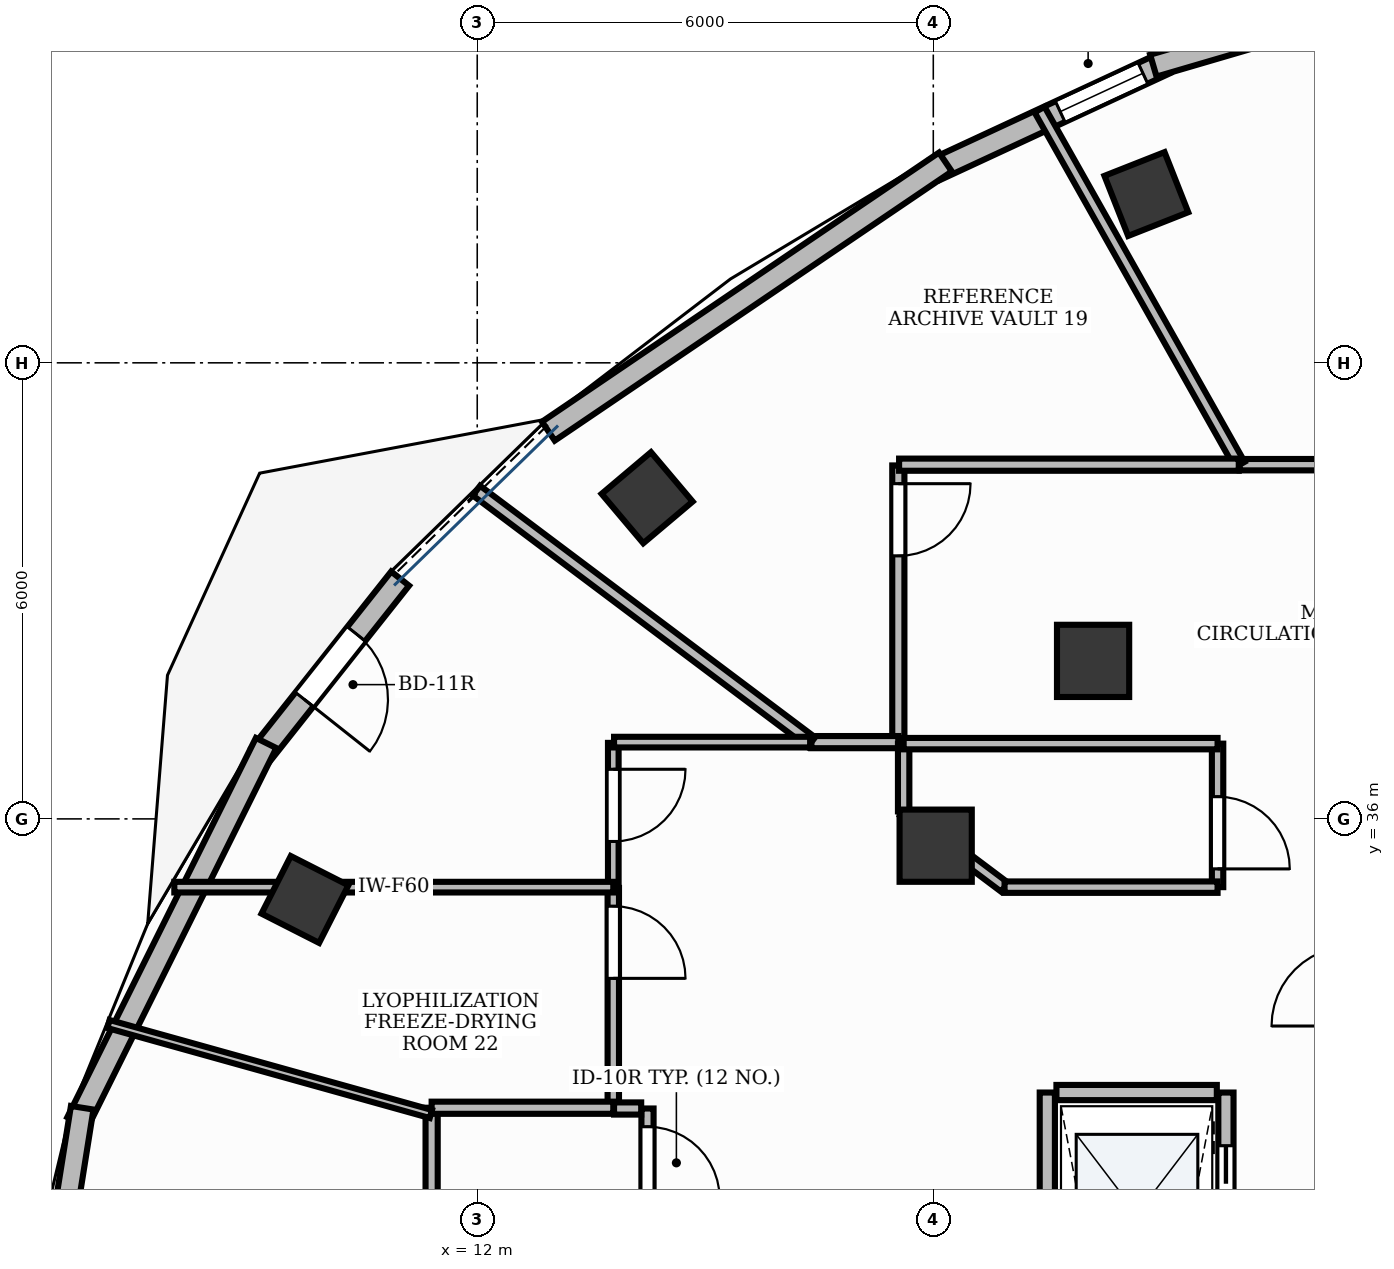
"""IFC4 building model, lengths in metres.
Left out: names, types, materials, properties, quantities, classifications, styles, units other than length and angle.
Written with IfcOpenShell. Run it as: python <this file> out.ifc"""

import sys

from ifc_helpers import new_model, si_unit, direction, frame, frame_2d, origin, origin_2d, place, context, subcontext, project, spatial, rectangle, extrude, element, fill, save


model = new_model("IFC4")
c1 = context("Model", 3, precision=1e-05, world=origin(), true_north=direction((0.0, 1.0)))
c2 = subcontext(c1, "Body", "Model", "MODEL_VIEW")
j1 = project(units=[si_unit("LENGTHUNIT", "METRE"), si_unit("PLANEANGLEUNIT", "RADIAN")], contexts=[c1])
p1 = place(None, origin())
s1 = spatial("IfcSite", under=j1, at=p1, CompositionType="ELEMENT")
p2 = place(p1, origin())
s2 = spatial("IfcBuilding", under=s1, at=p2, CompositionType="ELEMENT")
p3 = place(p2, frame((0.0, 0.0, 252.0)))
s3 = spatial("IfcBuildingStorey", under=s2, at=p3, CompositionType="ELEMENT", Elevation=252.0)
for number, where, z_axis, x_axis in (
    (1, (20.803, 44.22, -0.0), (0.0, 0.0, 1.0), (0.93, 0.367, 0.0)),
    (2, (14.235, 40.225, -0.0), (0.0, 0.0, 1.0), (0.764, 0.645, 0.0)),
):
    element("IfcColumn", number, at=place(p3, frame(where, z_axis=z_axis, x_axis=x_axis)), inside=s3, PredefinedType="COLUMN", context=c2, shape_type="SweptSolid", body=[
        extrude(rectangle(XDim=0.85, YDim=0.85, at=origin_2d()), origin(), (0.0, 0.0, 1.0), 3.901),
    ])
p4 = place(p3, frame((20.102, 38.079, -0.0), z_axis=(0.0, 0.0, 1.0), x_axis=(1.0, 0.0, 0.0)))
e3 = element("IfcColumn", 3, at=p4, inside=s3, PredefinedType="COLUMN", context=c2, shape_type="SweptSolid", body=[
    extrude(rectangle(XDim=0.95, YDim=0.95, at=origin_2d()), origin(), (0.0, 0.0, 1.0), 3.901),
])
p5 = place(p3, frame((9.733, 34.94, -0.0), z_axis=(0.0, 0.0, 1.0), x_axis=(0.453057191132, 0.891481453292, 0.0)))
e4 = element("IfcColumn", 4, at=p5, inside=s3, PredefinedType="COLUMN", context=c2, shape_type="SweptSolid", body=[
    extrude(rectangle(XDim=0.85, YDim=0.85, at=origin_2d()), origin(), (0.0, 0.0, 1.0), 3.901),
])
p6 = place(p3, frame((18.031, 35.647, -0.0), z_axis=(0.0, 0.0, 1.0), x_axis=(1.0, 0.0, 0.0)))
e5 = element("IfcColumn", 5, at=p6, inside=s3, PredefinedType="COLUMN", context=c2, shape_type="SweptSolid", body=[
    extrude(rectangle(XDim=0.95, YDim=0.95, at=origin_2d()), origin(), (0.0, 0.0, 1.0), 3.901),
])
p7 = place(p3, frame((21.054, 45.947, 0.0), z_axis=(0.0, 0.0, 1.0), x_axis=(-0.907141680649, -0.420825345278, 0.0)))
e6 = element("IfcWall", 6, at=p7, inside=s3, PredefinedType="STANDARD", context=c2, shape_type="SweptSolid", body=[
    extrude(rectangle(XDim=3.336, YDim=0.3, at=frame_2d((1.668, 0.0))), origin(), (0.0, 0.0, 1.0), 3.9),
])
p8 = place(p7, frame((0.326, 0.0, 0.9)))
e7 = element("IfcOpeningElement", 7, at=p8, cuts=e6, PredefinedType="OPENING", context=c2, shape_type="SweptSolid", body=[
    extrude(rectangle(XDim=1.2, YDim=2.7, at=frame_2d((0.6, 1.35))), frame((0.0, 0.165, 0.0), z_axis=(0.0, -1.0, 0.0), x_axis=(1.0, 0.0, 0.0)), (0.0, 0.0, 1.0), 0.33),
])
p9 = place(p3, frame((10.986, 39.161, 0.0), z_axis=(0.0, 0.0, 1.0), x_axis=(-0.620861534092, -0.783920248166, 0.0)))
e8 = element("IfcWall", 8, at=p9, inside=s3, PredefinedType="STANDARD", context=c2, shape_type="SweptSolid", body=[
    extrude(rectangle(XDim=2.957, YDim=0.3, at=frame_2d((1.479, 0.0))), origin(), (0.0, 0.0, 1.0), 3.9),
])
p10 = place(p9, frame((0.929, 0.0, 0.0)))
e9 = element("IfcOpeningElement", 9, at=p10, cuts=e8, PredefinedType="OPENING", context=c2, shape_type="SweptSolid", body=[
    extrude(rectangle(XDim=1.1, YDim=2.15, at=frame_2d((0.55, 1.075))), frame((0.0, 0.165, 0.0), z_axis=(0.0, -1.0, 0.0), x_axis=(1.0, 0.0, 0.0)), (0.0, 0.0, 1.0), 0.33),
])
p11 = place(p3, frame((27.418, 47.82, 0.0), z_axis=(0.0, 0.0, 1.0), x_axis=(-0.959675502853, -0.281110172749, 0.0)))
e10 = element("IfcWall", 10, at=p11, inside=s3, PredefinedType="STANDARD", context=c2, shape_type="SweptSolid", body=[
    extrude(rectangle(XDim=6.797, YDim=0.3, at=frame_2d((3.398, 0.0))), origin(), (0.0, 0.0, 1.0), 3.47),
])
p12 = place(p3, frame((18.159, 44.642, 0.0), z_axis=(0.0, 0.0, 1.0), x_axis=(-0.827734383496, -0.561120121167, 0.0)))
e11 = element("IfcWall", 11, at=p12, inside=s3, PredefinedType="STANDARD", context=c2, shape_type="SweptSolid", body=[
    extrude(rectangle(XDim=6.311, YDim=0.3, at=frame_2d((3.156, 0.0))), origin(), (0.0, 0.0, 1.0), 3.9),
])
p13 = place(p3, frame((9.222, 36.999, 0.0), z_axis=(0.0, 0.0, 1.0), x_axis=(-0.445162072567, -0.89545001488, 0.0)))
e12 = element("IfcWall", 12, at=p13, inside=s3, PredefinedType="STANDARD", context=c2, shape_type="SweptSolid", body=[
    extrude(rectangle(XDim=5.573, YDim=0.3, at=frame_2d((2.786, 0.0))), origin(), (0.0, 0.0, 1.0), 3.47),
])
p14 = place(p3, frame((6.803, 32.2, 0.0), z_axis=(0.0, 0.0, 1.0), x_axis=(-0.157240066957, -0.987560408959, 0.0)))
e13 = element("IfcWall", 13, at=p14, inside=s3, PredefinedType="STANDARD", context=c2, shape_type="SweptSolid", body=[
    extrude(rectangle(XDim=5.367, YDim=0.3, at=frame_2d((2.684, 0.0))), origin(), (0.0, 0.0, 1.0), 3.47),
])
p15 = place(p3, frame((19.5, 21.6, 0.0), z_axis=(0.0, 0.0, 1.0), x_axis=(0.0, 1.0, 0.0)))
e14 = element("IfcWall", 14, at=p15, inside=s3, PredefinedType="PARTITIONING", context=c2, shape_type="SweptSolid", body=[
    extrude(rectangle(XDim=10.8, YDim=0.2, at=frame_2d((5.4, 0.0))), origin(), (0.0, 0.0, 1.0), 2.91),
])
p16 = place(p3, frame((21.85, 21.6, 0.0), z_axis=(0.0, 0.0, 1.0), x_axis=(0.0, 1.0, 0.0)))
e15 = element("IfcWall", 15, at=p16, inside=s3, PredefinedType="PARTITIONING", context=c2, shape_type="SweptSolid", body=[
    extrude(rectangle(XDim=10.8, YDim=0.2, at=frame_2d((5.4, 0.0))), origin(), (0.0, 0.0, 1.0), 2.91),
])
p17 = place(p16, frame((0.9, 0.0, 0.0)))
e16 = element("IfcOpeningElement", 16, at=p17, cuts=e15, PredefinedType="OPENING", context=c2, shape_type="SweptSolid", body=[
    extrude(rectangle(XDim=1.1, YDim=2.2, at=frame_2d((0.55, 1.1))), frame((0.0, 0.115, 0.0), z_axis=(0.0, -1.0, 0.0), x_axis=(1.0, 0.0, 0.0)), (0.0, 0.0, 1.0), 0.23),
])
p18 = place(p16, frame((3.6, 0.0, 0.0)))
e17 = element("IfcOpeningElement", 17, at=p18, cuts=e15, PredefinedType="OPENING", context=c2, shape_type="SweptSolid", body=[
    extrude(rectangle(XDim=1.1, YDim=2.2, at=frame_2d((0.55, 1.1))), frame((0.0, 0.115, 0.0), z_axis=(0.0, -1.0, 0.0), x_axis=(1.0, 0.0, 0.0)), (0.0, 0.0, 1.0), 0.23),
])
p19 = place(p16, frame((6.3, 0.0, 0.0)))
e18 = element("IfcOpeningElement", 18, at=p19, cuts=e15, PredefinedType="OPENING", context=c2, shape_type="SweptSolid", body=[
    extrude(rectangle(XDim=1.1, YDim=2.2, at=frame_2d((0.55, 1.1))), frame((0.0, 0.115, 0.0), z_axis=(0.0, -1.0, 0.0), x_axis=(1.0, 0.0, 0.0)), (0.0, 0.0, 1.0), 0.23),
])
p20 = place(p16, frame((9.0, 0.0, 0.0)))
e19 = element("IfcOpeningElement", 19, at=p20, cuts=e15, PredefinedType="OPENING", context=c2, shape_type="SweptSolid", body=[
    extrude(rectangle(XDim=1.1, YDim=2.2, at=frame_2d((0.55, 1.1))), frame((0.0, 0.115, 0.0), z_axis=(0.0, -1.0, 0.0), x_axis=(1.0, 0.0, 0.0)), (0.0, 0.0, 1.0), 0.23),
])
p21 = place(p3, frame((19.62, 32.4, 0.0), z_axis=(0.0, 0.0, 1.0), x_axis=(1.0, 0.0, 0.0)))
e20 = element("IfcWall", 20, at=p21, inside=s3, PredefinedType="PARTITIONING", context=c2, shape_type="SweptSolid", body=[
    extrude(rectangle(XDim=2.11, YDim=0.2, at=frame_2d((1.055, 0.0))), origin(), (0.0, 0.0, 1.0), 2.91),
])
p22 = place(p3, frame((14.24, 32.19, 0.0), z_axis=(0.0, 0.0, 1.0), x_axis=(0.0, -1.0, 0.0)))
e21 = element("IfcWall", 21, at=p22, inside=s3, PredefinedType="PARTITIONING", context=c2, shape_type="SweptSolid", body=[
    extrude(rectangle(XDim=4.99, YDim=0.16, at=frame_2d((2.495, 0.0))), origin(), (0.0, 0.0, 1.0), 2.91),
])
p23 = place(p22, frame((0.24, 0.0, 0.0)))
e22 = element("IfcOpeningElement", 22, at=p23, cuts=e21, PredefinedType="OPENING", context=c2, shape_type="SweptSolid", body=[
    extrude(rectangle(XDim=0.95, YDim=2.15, at=frame_2d((0.475, 1.075))), frame((0.0, 0.095, 0.0), z_axis=(0.0, -1.0, 0.0), x_axis=(1.0, 0.0, 0.0)), (0.0, 0.0, 1.0), 0.19),
])
p24 = place(p3, frame((28.354, 40.66, 0.0), z_axis=(0.0, 0.0, 1.0), x_axis=(-1.0, 0.0, 0.0)))
e23 = element("IfcWall", 23, at=p24, inside=s3, PredefinedType="PARTITIONING", context=c2, shape_type="SweptSolid", body=[
    extrude(rectangle(XDim=6.323, YDim=0.15, at=frame_2d((3.162, 0.0))), origin(), (0.0, 0.0, 1.0), 2.91),
])
p25 = place(p24, frame((0.24, 0.0, 0.0)))
e24 = element("IfcOpeningElement", 24, at=p25, cuts=e23, PredefinedType="OPENING", context=c2, shape_type="SweptSolid", body=[
    extrude(rectangle(XDim=0.95, YDim=2.15, at=frame_2d((0.475, 1.075))), frame((0.0, 0.09, 0.0), z_axis=(0.0, -1.0, 0.0), x_axis=(1.0, 0.0, 0.0)), (0.0, 0.0, 1.0), 0.18),
])
p26 = place(p3, frame((17.54, 40.65, 0.0), z_axis=(0.0, 0.0, 1.0), x_axis=(0.0, -1.0, 0.0)))
e25 = element("IfcWall", 25, at=p26, inside=s3, PredefinedType="PARTITIONING", context=c2, shape_type="SweptSolid", body=[
    extrude(rectangle(XDim=3.64, YDim=0.16, at=frame_2d((1.82, 0.0))), origin(), (0.0, 0.0, 1.0), 2.91),
])
p27 = place(p26, frame((0.24, 0.0, 0.0)))
e26 = element("IfcOpeningElement", 26, at=p27, cuts=e25, PredefinedType="OPENING", context=c2, shape_type="SweptSolid", body=[
    extrude(rectangle(XDim=0.95, YDim=2.15, at=frame_2d((0.475, 1.075))), frame((0.0, 0.095, 0.0), z_axis=(0.0, -1.0, 0.0), x_axis=(1.0, 0.0, 0.0)), (0.0, 0.0, 1.0), 0.19),
])
p28 = place(p3, frame((21.74, 36.99, 0.0), z_axis=(0.0, 0.0, 1.0), x_axis=(0.0, -1.0, 0.0)))
e27 = element("IfcWall", 27, at=p28, inside=s3, PredefinedType="PARTITIONING", context=c2, shape_type="SweptSolid", body=[
    extrude(rectangle(XDim=1.888, YDim=0.15, at=frame_2d((0.944, 0.0))), origin(), (0.0, 0.0, 1.0), 2.91),
])
p29 = place(p28, frame((0.698, 0.0, 0.0)))
e28 = element("IfcOpeningElement", 28, at=p29, cuts=e27, PredefinedType="OPENING", context=c2, shape_type="SweptSolid", body=[
    extrude(rectangle(XDim=0.95, YDim=2.15, at=frame_2d((0.475, 1.075))), frame((0.0, 0.09, 0.0), z_axis=(0.0, -1.0, 0.0), x_axis=(1.0, 0.0, 0.0)), (0.0, 0.0, 1.0), 0.18),
])
p30 = place(p3, frame((13.79, 37.0, 0.0), z_axis=(0.0, 0.0, 1.0), x_axis=(0.0, -1.0, 0.0)))
e29 = element("IfcWall", 29, at=p30, inside=s3, PredefinedType="PARTITIONING", context=c2, shape_type="SweptSolid", body=[
    extrude(rectangle(XDim=1.898, YDim=0.14, at=frame_2d((0.949, 0.0))), origin(), (0.0, 0.0, 1.0), 2.91),
])
p31 = place(p30, frame((0.347, 0.0, 0.0)))
e30 = element("IfcOpeningElement", 30, at=p31, cuts=e29, PredefinedType="OPENING", context=c2, shape_type="SweptSolid", body=[
    extrude(rectangle(XDim=0.95, YDim=2.15, at=frame_2d((0.475, 1.075))), frame((0.0, 0.085, 0.0), z_axis=(0.0, -1.0, 0.0), x_axis=(1.0, 0.0, 0.0)), (0.0, 0.0, 1.0), 0.17),
])
p32 = place(p3, frame((13.79, 35.092, 0.0), z_axis=(0.0, 0.0, 1.0), x_axis=(0.0, -1.0, 0.0)))
e31 = element("IfcWall", 31, at=p32, inside=s3, PredefinedType="PARTITIONING", context=c2, shape_type="SweptSolid", body=[
    extrude(rectangle(XDim=2.882, YDim=0.15, at=frame_2d((1.441, 0.0))), origin(), (0.0, 0.0, 1.0), 2.91),
])
p33 = place(p32, frame((0.24, 0.0, 0.0)))
e32 = element("IfcOpeningElement", 32, at=p33, cuts=e31, PredefinedType="OPENING", context=c2, shape_type="SweptSolid", body=[
    extrude(rectangle(XDim=0.95, YDim=2.15, at=frame_2d((0.475, 1.075))), frame((0.0, 0.09, 0.0), z_axis=(0.0, -1.0, 0.0), x_axis=(1.0, 0.0, 0.0)), (0.0, 0.0, 1.0), 0.18),
])
p34 = place(p3, frame((13.8, 32.19, 0.0), z_axis=(0.0, 0.0, 1.0), x_axis=(1.0, 0.0, 0.0)))
e33 = element("IfcWall", 33, at=p34, inside=s3, PredefinedType="PARTITIONING", context=c2, shape_type="SweptSolid", body=[
    extrude(rectangle(XDim=0.357, YDim=0.16, at=frame_2d((0.178, 0.0))), origin(), (0.0, 0.0, 1.0), 2.91),
])
p35 = place(p3, frame((11.4, 27.2, 0.0), z_axis=(0.0, 0.0, 1.0), x_axis=(0.0, 1.0, 0.0)))
e34 = element("IfcWall", 34, at=p35, inside=s3, PredefinedType="PARTITIONING", context=c2, shape_type="SweptSolid", body=[
    extrude(rectangle(XDim=5.0, YDim=0.16, at=frame_2d((2.5, 0.0))), origin(), (0.0, 0.0, 1.0), 2.91),
])
p36 = place(p3, frame((11.4, 32.2, 0.0), z_axis=(0.0, 0.0, 1.0), x_axis=(1.0, 0.0, 0.0)))
e35 = element("IfcWall", 35, at=p36, inside=s3, PredefinedType="PARTITIONING", context=c2, shape_type="SweptSolid", body=[
    extrude(rectangle(XDim=2.39, YDim=0.16, at=frame_2d((1.195, 0.0))), origin(), (0.0, 0.0, 1.0), 2.91),
])
p37 = place(p3, frame((7.149, 33.301, 0.0), z_axis=(0.0, 0.0, 1.0), x_axis=(0.963167586418, -0.268901841707, 0.0)))
e36 = element("IfcWall", 36, at=p37, inside=s3, PredefinedType="MOVABLE", context=c2, shape_type="SweptSolid", body=[
    extrude(rectangle(XDim=4.403, YDim=0.11, at=frame_2d((2.202, 0.0))), origin(), (0.0, 0.0, 1.0), 2.91),
])
p38 = place(p3, frame((22.031, 40.66, 0.0), z_axis=(0.0, 0.0, 1.0), x_axis=(-0.490903118402, 0.871214169044, 0.0)))
e37 = element("IfcWall", 37, at=p38, inside=s3, PredefinedType="PARTITIONING", context=c2, shape_type="SweptSolid", body=[
    extrude(rectangle(XDim=5.362, YDim=0.15, at=frame_2d((2.681, 0.0))), origin(), (0.0, 0.0, 1.0), 2.91),
])
p39 = place(p3, frame((22.019, 40.66, 0.0), z_axis=(0.0, 0.0, 1.0), x_axis=(-1.0, 0.0, 0.0)))
e38 = element("IfcWall", 38, at=p39, inside=s3, PredefinedType="PARTITIONING", context=c2, shape_type="SweptSolid", body=[
    extrude(rectangle(XDim=4.469, YDim=0.16, at=frame_2d((2.234, 0.0))), origin(), (0.0, 0.0, 1.0), 2.91),
])
p40 = place(p3, frame((17.54, 37.01, 0.0), z_axis=(0.0, 0.0, 1.0), x_axis=(-1.0, 0.0, 0.0)))
e39 = element("IfcWall", 39, at=p40, inside=s3, PredefinedType="PARTITIONING", context=c2, shape_type="SweptSolid", body=[
    extrude(rectangle(XDim=1.144, YDim=0.16, at=frame_2d((0.572, 0.0))), origin(), (0.0, 0.0, 1.0), 2.91),
])
p41 = place(p3, frame((16.396, 37.01, 0.0), z_axis=(0.0, 0.0, 1.0), x_axis=(-0.799686236125, 0.600418124104, 0.0)))
e40 = element("IfcWall", 40, at=p41, inside=s3, PredefinedType="PARTITIONING", context=c2, shape_type="SweptSolid", body=[
    extrude(rectangle(XDim=5.511, YDim=0.16, at=frame_2d((2.755, 0.0))), origin(), (0.0, 0.0, 1.0), 2.91),
])
p42 = place(p3, frame((18.938, 35.102, 0.0), z_axis=(0.0, 0.0, 1.0), x_axis=(-0.799629226512, 0.600494046689, 0.0)))
e41 = element("IfcWall", 41, at=p42, inside=s3, PredefinedType="PARTITIONING", context=c2, shape_type="SweptSolid", body=[
    extrude(rectangle(XDim=1.66, YDim=0.15, at=frame_2d((0.83, 0.0))), origin(), (0.0, 0.0, 1.0), 2.91),
])
p43 = place(p3, frame((17.61, 36.099, 0.0), z_axis=(0.0, 0.0, 1.0), x_axis=(0.0, 1.0, 0.0)))
e42 = element("IfcWall", 42, at=p43, inside=s3, PredefinedType="PARTITIONING", context=c2, shape_type="SweptSolid", body=[
    extrude(rectangle(XDim=0.891, YDim=0.15, at=frame_2d((0.446, 0.0))), origin(), (0.0, 0.0, 1.0), 2.91),
])
p44 = place(p3, frame((17.61, 36.99, 0.0), z_axis=(0.0, 0.0, 1.0), x_axis=(1.0, 0.0, 0.0)))
e43 = element("IfcWall", 43, at=p44, inside=s3, PredefinedType="PARTITIONING", context=c2, shape_type="SweptSolid", body=[
    extrude(rectangle(XDim=4.13, YDim=0.15, at=frame_2d((2.065, 0.0))), origin(), (0.0, 0.0, 1.0), 2.91),
])
p45 = place(p3, frame((21.74, 35.102, 0.0), z_axis=(0.0, 0.0, 1.0), x_axis=(-1.0, 0.0, 0.0)))
e44 = element("IfcWall", 44, at=p45, inside=s3, PredefinedType="PARTITIONING", context=c2, shape_type="SweptSolid", body=[
    extrude(rectangle(XDim=2.802, YDim=0.15, at=frame_2d((1.401, 0.0))), origin(), (0.0, 0.0, 1.0), 2.91),
])
p46 = place(p3, frame((16.38, 37.01, 0.0), z_axis=(0.0, 0.0, 1.0), x_axis=(-1.0, 0.0, 0.0)))
e45 = element("IfcWall", 45, at=p46, inside=s3, PredefinedType="PARTITIONING", context=c2, shape_type="SweptSolid", body=[
    extrude(rectangle(XDim=2.58, YDim=0.14, at=frame_2d((1.29, 0.0))), origin(), (0.0, 0.0, 1.0), 2.91),
])
p47 = place(p3, frame((13.79, 35.102, 0.0), z_axis=(0.0, 0.0, 1.0), x_axis=(-1.0, 0.0, 0.0)))
e46 = element("IfcWall", 46, at=p47, inside=s3, PredefinedType="PARTITIONING", context=c2, shape_type="SweptSolid", body=[
    extrude(rectangle(XDim=5.775, YDim=0.14, at=frame_2d((2.888, 0.0))), origin(), (0.0, 0.0, 1.0), 2.91),
])
p48 = place(p8, origin())
e47 = element("IfcWindow", 47, at=p48, inside=s3, PartitioningType="SINGLE_PANEL", PredefinedType="WINDOW", context=c2, shape_type="SweptSolid", body=[
    extrude(rectangle(XDim=1.2, YDim=2.7, at=frame_2d((0.6, 1.35))), frame((0.0, 0.03, 0.0), z_axis=(0.0, -1.0, 0.0), x_axis=(1.0, 0.0, 0.0)), (0.0, 0.0, 1.0), 0.06),
])
fill(e7, e47)
p49 = place(p10, origin())
e48 = element("IfcDoor", 48, at=p49, inside=s3, OperationType="SINGLE_SWING_RIGHT", PredefinedType="DOOR", context=c2, shape_type="SweptSolid", body=[
    extrude(rectangle(XDim=1.1, YDim=2.15, at=frame_2d((0.55, 1.075))), frame((0.0, 0.025, 0.0), z_axis=(0.0, -1.0, 0.0), x_axis=(1.0, 0.0, 0.0)), (0.0, 0.0, 1.0), 0.05),
])
fill(e9, e48)
p50 = place(p20, origin())
e49 = element("IfcDoor", 49, at=p50, inside=s3, OperationType="DOUBLE_DOOR_SLIDING", PredefinedType="DOOR", context=c2, shape_type="SweptSolid", body=[
    extrude(rectangle(XDim=1.1, YDim=2.2, at=frame_2d((0.55, 1.1))), frame((0.0, 0.025, 0.0), z_axis=(0.0, -1.0, 0.0), x_axis=(1.0, 0.0, 0.0)), (0.0, 0.0, 1.0), 0.05),
])
fill(e19, e49)
p51 = place(p23, origin())
e50 = element("IfcDoor", 50, at=p51, inside=s3, OperationType="SINGLE_SWING_RIGHT", PredefinedType="DOOR", context=c2, shape_type="SweptSolid", body=[
    extrude(rectangle(XDim=0.95, YDim=2.15, at=frame_2d((0.475, 1.075))), frame((0.0, 0.025, 0.0), z_axis=(0.0, -1.0, 0.0), x_axis=(1.0, 0.0, 0.0)), (0.0, 0.0, 1.0), 0.05),
])
fill(e22, e50)
p52 = place(p27, origin())
e51 = element("IfcDoor", 51, at=p52, inside=s3, OperationType="SINGLE_SWING_LEFT", PredefinedType="DOOR", context=c2, shape_type="SweptSolid", body=[
    extrude(rectangle(XDim=0.95, YDim=2.15, at=frame_2d((0.475, 1.075))), frame((0.0, 0.025, 0.0), z_axis=(0.0, -1.0, 0.0), x_axis=(1.0, 0.0, 0.0)), (0.0, 0.0, 1.0), 0.05),
])
fill(e26, e51)
p53 = place(p29, origin())
e52 = element("IfcDoor", 52, at=p53, inside=s3, OperationType="SINGLE_SWING_RIGHT", PredefinedType="DOOR", context=c2, shape_type="SweptSolid", body=[
    extrude(rectangle(XDim=0.95, YDim=2.15, at=frame_2d((0.475, 1.075))), frame((0.0, 0.025, 0.0), z_axis=(0.0, -1.0, 0.0), x_axis=(1.0, 0.0, 0.0)), (0.0, 0.0, 1.0), 0.05),
])
fill(e28, e52)
p54 = place(p31, origin())
e53 = element("IfcDoor", 53, at=p54, inside=s3, OperationType="SINGLE_SWING_LEFT", PredefinedType="DOOR", context=c2, shape_type="SweptSolid", body=[
    extrude(rectangle(XDim=0.95, YDim=2.15, at=frame_2d((0.475, 1.075))), frame((0.0, 0.025, 0.0), z_axis=(0.0, -1.0, 0.0), x_axis=(1.0, 0.0, 0.0)), (0.0, 0.0, 1.0), 0.05),
])
fill(e30, e53)
p55 = place(p33, origin())
e54 = element("IfcDoor", 54, at=p55, inside=s3, OperationType="SINGLE_SWING_RIGHT", PredefinedType="DOOR", context=c2, shape_type="SweptSolid", body=[
    extrude(rectangle(XDim=0.95, YDim=2.15, at=frame_2d((0.475, 1.075))), frame((0.0, 0.025, 0.0), z_axis=(0.0, -1.0, 0.0), x_axis=(1.0, 0.0, 0.0)), (0.0, 0.0, 1.0), 0.05),
])
fill(e32, e54)
save(model, sys.argv[1])
